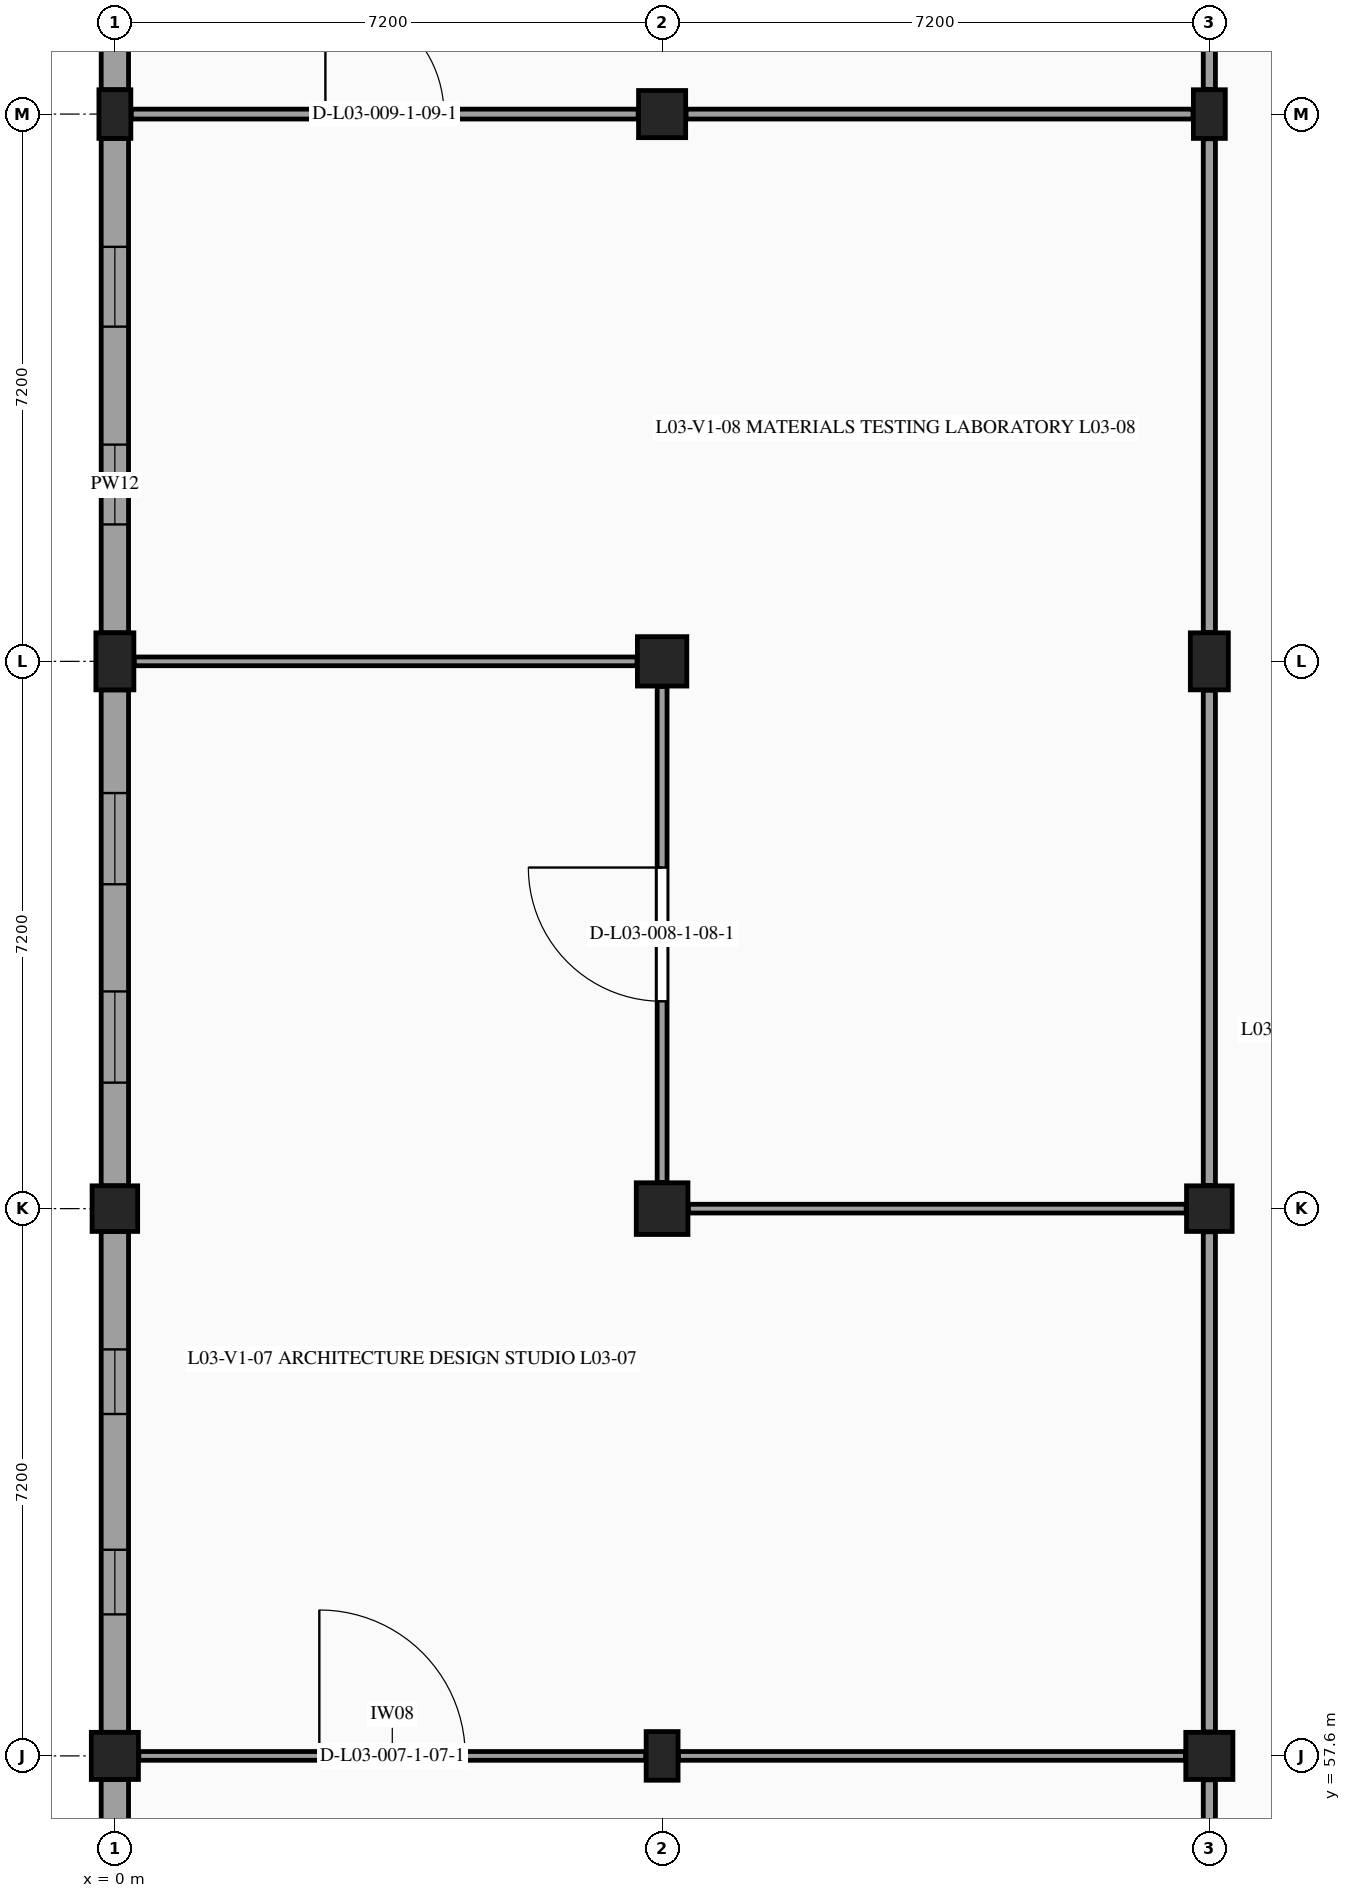
"""IFC4 building model, lengths in metres.
Left out: names, types, materials, properties, quantities, classifications, styles, units other than length and angle.
Written with IfcOpenShell. Run it as: python <this file> out.ifc"""

import sys

from ifc_helpers import new_model, si_unit, direction, frame, frame_2d, origin, origin_2d, place, context, subcontext, project, spatial, rectangle, extrude, element, fill, save


model = new_model("IFC4")
c1 = context("Model", 3, precision=1e-05, world=origin(), true_north=direction((0.0, 1.0)))
c2 = subcontext(c1, "Body", "Model", "MODEL_VIEW")
j1 = project(units=[si_unit("LENGTHUNIT", "METRE"), si_unit("PLANEANGLEUNIT", "RADIAN")], contexts=[c1])
p1 = place(None, origin())
s1 = spatial("IfcSite", under=j1, at=p1, CompositionType="ELEMENT")
p2 = place(p1, origin())
s2 = spatial("IfcBuilding", under=s1, at=p2, CompositionType="ELEMENT")
p3 = place(p2, frame((0.0, 0.0, 14.4)))
s3 = spatial("IfcBuildingStorey", under=s2, at=p3, CompositionType="ELEMENT", Elevation=14.4)
p4 = place(p3, frame((0.0, 57.6, 0.0), z_axis=(0.0, 0.0, 1.0), x_axis=(1.0, 0.0, 0.0)))
e1 = element("IfcColumn", 1, at=p4, inside=s3, PredefinedType="COLUMN", context=c2, shape_type="SweptSolid", body=[
    extrude(rectangle(XDim=0.62, YDim=0.62, at=origin_2d()), origin(), (0.0, 0.0, 1.0), 4.2),
])
p5 = place(p3, frame((0.0, 64.8, 0.0), z_axis=(0.0, 0.0, 1.0), x_axis=(1.0, 0.0, 0.0)))
e2 = element("IfcColumn", 2, at=p5, inside=s3, PredefinedType="COLUMN", context=c2, shape_type="SweptSolid", body=[
    extrude(rectangle(XDim=0.6, YDim=0.6, at=origin_2d()), origin(), (0.0, 0.0, 1.0), 4.2),
])
p6 = place(p3, frame((0.0, 72.0, 0.0), z_axis=(0.0, 0.0, 1.0), x_axis=(1.0, 0.0, 0.0)))
e3 = element("IfcColumn", 3, at=p6, inside=s3, PredefinedType="COLUMN", context=c2, shape_type="SweptSolid", body=[
    extrude(rectangle(XDim=0.5, YDim=0.75, at=origin_2d()), origin(), (0.0, 0.0, 1.0), 4.2),
])
for number, where, z_axis, x_axis in (
    (4, (0.0, 79.2, 0.0), (0.0, 0.0, 1.0), (1.0, 0.0, 0.0)),
    (5, (7.2, 57.6, 0.0), (0.0, 0.0, 1.0), (1.0, 0.0, 0.0)),
):
    element("IfcColumn", number, at=place(p3, frame(where, z_axis=z_axis, x_axis=x_axis)), inside=s3, PredefinedType="PILASTER", context=c2, shape_type="SweptSolid", body=[
        extrude(rectangle(XDim=0.42, YDim=0.64, at=origin_2d()), origin(), (0.0, 0.0, 1.0), 4.2),
    ])
p7 = place(p3, frame((7.2, 64.8, 0.0), z_axis=(0.0, 0.0, 1.0), x_axis=(1.0, 0.0, 0.0)))
e6 = element("IfcColumn", 6, at=p7, inside=s3, PredefinedType="COLUMN", context=c2, shape_type="SweptSolid", body=[
    extrude(rectangle(XDim=0.68, YDim=0.68, at=origin_2d()), origin(), (0.0, 0.0, 1.0), 4.2),
])
p8 = place(p3, frame((7.2, 72.0, 0.0), z_axis=(0.0, 0.0, 1.0), x_axis=(1.0, 0.0, 0.0)))
e7 = element("IfcColumn", 7, at=p8, inside=s3, PredefinedType="COLUMN", context=c2, shape_type="SweptSolid", body=[
    extrude(rectangle(XDim=0.65, YDim=0.65, at=origin_2d()), origin(), (0.0, 0.0, 1.0), 4.2),
])
for number, where, z_axis, x_axis in (
    (8, (7.2, 79.2, 0.0), (0.0, 0.0, 1.0), (1.0, 0.0, 0.0)),
    (9, (14.4, 57.6, 0.0), (0.0, 0.0, 1.0), (1.0, 0.0, 0.0)),
):
    element("IfcColumn", number, at=place(p3, frame(where, z_axis=z_axis, x_axis=x_axis)), inside=s3, PredefinedType="COLUMN", context=c2, shape_type="SweptSolid", body=[
        extrude(rectangle(XDim=0.62, YDim=0.62, at=origin_2d()), origin(), (0.0, 0.0, 1.0), 4.2),
    ])
p9 = place(p3, frame((14.4, 64.8, 0.0), z_axis=(0.0, 0.0, 1.0), x_axis=(1.0, 0.0, 0.0)))
e10 = element("IfcColumn", 10, at=p9, inside=s3, PredefinedType="COLUMN", context=c2, shape_type="SweptSolid", body=[
    extrude(rectangle(XDim=0.6, YDim=0.6, at=origin_2d()), origin(), (0.0, 0.0, 1.0), 4.2),
])
p10 = place(p3, frame((14.4, 72.0, 0.0), z_axis=(0.0, 0.0, 1.0), x_axis=(1.0, 0.0, 0.0)))
e11 = element("IfcColumn", 11, at=p10, inside=s3, PredefinedType="COLUMN", context=c2, shape_type="SweptSolid", body=[
    extrude(rectangle(XDim=0.5, YDim=0.75, at=origin_2d()), origin(), (0.0, 0.0, 1.0), 4.2),
])
p11 = place(p3, frame((14.4, 79.2, 0.0), z_axis=(0.0, 0.0, 1.0), x_axis=(1.0, 0.0, 0.0)))
e12 = element("IfcColumn", 12, at=p11, inside=s3, PredefinedType="PILASTER", context=c2, shape_type="SweptSolid", body=[
    extrude(rectangle(XDim=0.42, YDim=0.64, at=origin_2d()), origin(), (0.0, 0.0, 1.0), 4.2),
])
p12 = place(p3, frame((0.0, 50.725, 0.0), z_axis=(0.0, 0.0, 1.0), x_axis=(0.0, 1.0, 0.0)))
e13 = element("IfcWall", 13, at=p12, inside=s3, PredefinedType="STANDARD", context=c2, shape_type="SweptSolid", body=[
    extrude(rectangle(XDim=6.565, YDim=0.36, at=frame_2d((3.282, 0.0))), origin(), (0.0, 0.0, 1.0), 3.135),
])
p13 = place(p12, frame((1.469, 0.0, 1.15)))
e14 = element("IfcOpeningElement", 14, at=p13, cuts=e13, PredefinedType="OPENING", context=c2, shape_type="SweptSolid", body=[
    extrude(rectangle(XDim=1.0, YDim=1.2, at=frame_2d((0.5, 0.6))), frame((0.0, 0.19, 0.0), z_axis=(0.0, -1.0, 0.0), x_axis=(1.0, 0.0, 0.0)), (0.0, 0.0, 1.0), 0.38),
])
p14 = place(p12, frame((4.095, 0.0, 1.15)))
e15 = element("IfcOpeningElement", 15, at=p14, cuts=e13, PredefinedType="OPENING", context=c2, shape_type="SweptSolid", body=[
    extrude(rectangle(XDim=1.0, YDim=1.2, at=frame_2d((0.5, 0.6))), frame((0.0, 0.19, 0.0), z_axis=(0.0, -1.0, 0.0), x_axis=(1.0, 0.0, 0.0)), (0.0, 0.0, 1.0), 0.38),
])
p15 = place(p3, frame((0.0, 57.91, 0.0), z_axis=(0.0, 0.0, 1.0), x_axis=(0.0, 1.0, 0.0)))
e16 = element("IfcWall", 16, at=p15, inside=s3, PredefinedType="STANDARD", context=c2, shape_type="SweptSolid", body=[
    extrude(rectangle(XDim=6.59, YDim=0.36, at=frame_2d((3.295, 0.0))), origin(), (0.0, 0.0, 1.0), 3.135),
])
p16 = place(p15, frame((1.552, 0.0, 1.15)))
e17 = element("IfcOpeningElement", 17, at=p16, cuts=e16, PredefinedType="OPENING", context=c2, shape_type="SweptSolid", body=[
    extrude(rectangle(XDim=0.85, YDim=1.25, at=frame_2d((0.425, 0.625))), frame((0.0, 0.19, 0.0), z_axis=(0.0, -1.0, 0.0), x_axis=(1.0, 0.0, 0.0)), (0.0, 0.0, 1.0), 0.38),
])
p17 = place(p15, frame((4.188, 0.0, 1.15)))
e18 = element("IfcOpeningElement", 18, at=p17, cuts=e16, PredefinedType="OPENING", context=c2, shape_type="SweptSolid", body=[
    extrude(rectangle(XDim=0.85, YDim=1.25, at=frame_2d((0.425, 0.625))), frame((0.0, 0.19, 0.0), z_axis=(0.0, -1.0, 0.0), x_axis=(1.0, 0.0, 0.0)), (0.0, 0.0, 1.0), 0.38),
])
p18 = place(p3, frame((0.0, 65.1, 0.0), z_axis=(0.0, 0.0, 1.0), x_axis=(0.0, 1.0, 0.0)))
e19 = element("IfcWall", 19, at=p18, inside=s3, PredefinedType="STANDARD", context=c2, shape_type="SweptSolid", body=[
    extrude(rectangle(XDim=6.525, YDim=0.36, at=frame_2d((3.262, 0.0))), origin(), (0.0, 0.0, 1.0), 3.135),
])
p19 = place(p18, frame((1.357, 0.0, 1.15)))
e20 = element("IfcOpeningElement", 20, at=p19, cuts=e19, PredefinedType="OPENING", context=c2, shape_type="SweptSolid", body=[
    extrude(rectangle(XDim=1.2, YDim=1.35, at=frame_2d((0.6, 0.675))), frame((0.0, 0.19, 0.0), z_axis=(0.0, -1.0, 0.0), x_axis=(1.0, 0.0, 0.0)), (0.0, 0.0, 1.0), 0.38),
])
p20 = place(p18, frame((3.968, 0.0, 1.15)))
e21 = element("IfcOpeningElement", 21, at=p20, cuts=e19, PredefinedType="OPENING", context=c2, shape_type="SweptSolid", body=[
    extrude(rectangle(XDim=1.2, YDim=1.35, at=frame_2d((0.6, 0.675))), frame((0.0, 0.19, 0.0), z_axis=(0.0, -1.0, 0.0), x_axis=(1.0, 0.0, 0.0)), (0.0, 0.0, 1.0), 0.38),
])
p21 = place(p3, frame((0.0, 72.375, 0.0), z_axis=(0.0, 0.0, 1.0), x_axis=(0.0, 1.0, 0.0)))
e22 = element("IfcWall", 22, at=p21, inside=s3, PredefinedType="STANDARD", context=c2, shape_type="SweptSolid", body=[
    extrude(rectangle(XDim=6.505, YDim=0.36, at=frame_2d((3.252, 0.0))), origin(), (0.0, 0.0, 1.0), 3.135),
])
p22 = place(p21, frame((1.427, 0.0, 1.15)))
e23 = element("IfcOpeningElement", 23, at=p22, cuts=e22, PredefinedType="OPENING", context=c2, shape_type="SweptSolid", body=[
    extrude(rectangle(XDim=1.05, YDim=1.35, at=frame_2d((0.525, 0.675))), frame((0.0, 0.19, 0.0), z_axis=(0.0, -1.0, 0.0), x_axis=(1.0, 0.0, 0.0)), (0.0, 0.0, 1.0), 0.38),
])
p23 = place(p21, frame((4.029, 0.0, 1.15)))
e24 = element("IfcOpeningElement", 24, at=p23, cuts=e22, PredefinedType="OPENING", context=c2, shape_type="SweptSolid", body=[
    extrude(rectangle(XDim=1.05, YDim=1.35, at=frame_2d((0.525, 0.675))), frame((0.0, 0.19, 0.0), z_axis=(0.0, -1.0, 0.0), x_axis=(1.0, 0.0, 0.0)), (0.0, 0.0, 1.0), 0.38),
])
p24 = place(p3, frame((0.0, 79.52, 0.0), z_axis=(0.0, 0.0, 1.0), x_axis=(0.0, 1.0, 0.0)))
e25 = element("IfcWall", 25, at=p24, inside=s3, PredefinedType="STANDARD", context=c2, shape_type="SweptSolid", body=[
    extrude(rectangle(XDim=6.54, YDim=0.36, at=frame_2d((3.27, 0.0))), origin(), (0.0, 0.0, 1.0), 3.135),
])
p25 = place(p24, frame((1.512, 0.0, 1.15)))
e26 = element("IfcOpeningElement", 26, at=p25, cuts=e25, PredefinedType="OPENING", context=c2, shape_type="SweptSolid", body=[
    extrude(rectangle(XDim=0.9, YDim=1.3, at=frame_2d((0.45, 0.65))), frame((0.0, 0.19, 0.0), z_axis=(0.0, -1.0, 0.0), x_axis=(1.0, 0.0, 0.0)), (0.0, 0.0, 1.0), 0.38),
])
p26 = place(p24, frame((4.128, 0.0, 1.15)))
e27 = element("IfcOpeningElement", 27, at=p26, cuts=e25, PredefinedType="OPENING", context=c2, shape_type="SweptSolid", body=[
    extrude(rectangle(XDim=0.9, YDim=1.3, at=frame_2d((0.45, 0.65))), frame((0.0, 0.19, 0.0), z_axis=(0.0, -1.0, 0.0), x_axis=(1.0, 0.0, 0.0)), (0.0, 0.0, 1.0), 0.38),
])
p27 = place(p3, frame((0.315, 57.6, 0.0), z_axis=(0.0, 0.0, 1.0), x_axis=(1.0, 0.0, 0.0)))
e28 = element("IfcWall", 28, at=p27, inside=s3, PredefinedType="PARTITIONING", context=c2, shape_type="SweptSolid", body=[
    extrude(rectangle(XDim=6.67, YDim=0.115, at=frame_2d((3.335, 0.0))), origin(), (0.0, 0.0, 1.0), 3.215),
])
p28 = place(p27, frame((2.375, 0.0, 0.0)))
e29 = element("IfcOpeningElement", 29, at=p28, cuts=e28, PredefinedType="OPENING", context=c2, shape_type="SweptSolid", body=[
    extrude(rectangle(XDim=1.92, YDim=2.35, at=frame_2d((0.96, 1.175))), frame((0.0, 0.067, 0.0), z_axis=(0.0, -1.0, 0.0), x_axis=(1.0, 0.0, 0.0)), (0.0, 0.0, 1.0), 0.135),
])
p29 = place(p3, frame((7.2, 65.145, 0.0), z_axis=(0.0, 0.0, 1.0), x_axis=(0.0, 1.0, 0.0)))
e30 = element("IfcWall", 30, at=p29, inside=s3, PredefinedType="PARTITIONING", context=c2, shape_type="SweptSolid", body=[
    extrude(rectangle(XDim=6.525, YDim=0.13, at=frame_2d((3.262, 0.0))), origin(), (0.0, 0.0, 1.0), 3.245),
])
p30 = place(p29, frame((2.383, 0.0, 0.0)))
e31 = element("IfcOpeningElement", 31, at=p30, cuts=e30, PredefinedType="OPENING", context=c2, shape_type="SweptSolid", body=[
    extrude(rectangle(XDim=1.76, YDim=2.3, at=frame_2d((0.88, 1.15))), frame((0.0, 0.075, 0.0), z_axis=(0.0, -1.0, 0.0), x_axis=(1.0, 0.0, 0.0)), (0.0, 0.0, 1.0), 0.15),
])
p31 = place(p3, frame((0.255, 72.0, 0.0), z_axis=(0.0, 0.0, 1.0), x_axis=(1.0, 0.0, 0.0)))
e32 = element("IfcWall", 32, at=p31, inside=s3, PredefinedType="PARTITIONING", context=c2, shape_type="SweptSolid", body=[
    extrude(rectangle(XDim=6.615, YDim=0.115, at=frame_2d((3.308, 0.0))), origin(), (0.0, 0.0, 1.0), 3.215),
])
p32 = place(p3, frame((0.215, 79.2, 0.0), z_axis=(0.0, 0.0, 1.0), x_axis=(1.0, 0.0, 0.0)))
e33 = element("IfcWall", 33, at=p32, inside=s3, PredefinedType="PARTITIONING", context=c2, shape_type="SweptSolid", body=[
    extrude(rectangle(XDim=6.67, YDim=0.13, at=frame_2d((3.335, 0.0))), origin(), (0.0, 0.0, 1.0), 3.215),
])
p33 = place(p32, frame((2.555, 0.0, 0.0)))
e34 = element("IfcOpeningElement", 34, at=p33, cuts=e33, PredefinedType="OPENING", context=c2, shape_type="SweptSolid", body=[
    extrude(rectangle(XDim=1.56, YDim=2.25, at=frame_2d((0.78, 1.125))), frame((0.0, 0.075, 0.0), z_axis=(0.0, -1.0, 0.0), x_axis=(1.0, 0.0, 0.0)), (0.0, 0.0, 1.0), 0.15),
])
p34 = place(p3, frame((14.4, 50.73, 0.0), z_axis=(0.0, 0.0, 1.0), x_axis=(0.0, 1.0, 0.0)))
e35 = element("IfcWall", 35, at=p34, inside=s3, PredefinedType="PARTITIONING", context=c2, shape_type="SweptSolid", body=[
    extrude(rectangle(XDim=6.555, YDim=0.16, at=frame_2d((3.277, 0.0))), origin(), (0.0, 0.0, 1.0), 3.25),
])
p35 = place(p3, frame((7.415, 57.6, 0.0), z_axis=(0.0, 0.0, 1.0), x_axis=(1.0, 0.0, 0.0)))
e36 = element("IfcWall", 36, at=p35, inside=s3, PredefinedType="PARTITIONING", context=c2, shape_type="SweptSolid", body=[
    extrude(rectangle(XDim=6.67, YDim=0.115, at=frame_2d((3.335, 0.0))), origin(), (0.0, 0.0, 1.0), 3.22),
])
p36 = place(p3, frame((14.4, 57.915, 0.0), z_axis=(0.0, 0.0, 1.0), x_axis=(0.0, 1.0, 0.0)))
e37 = element("IfcWall", 37, at=p36, inside=s3, PredefinedType="PARTITIONING", context=c2, shape_type="SweptSolid", body=[
    extrude(rectangle(XDim=6.58, YDim=0.16, at=frame_2d((3.29, 0.0))), origin(), (0.0, 0.0, 1.0), 3.245),
])
p37 = place(p3, frame((7.545, 64.8, 0.0), z_axis=(0.0, 0.0, 1.0), x_axis=(1.0, 0.0, 0.0)))
e38 = element("IfcWall", 38, at=p37, inside=s3, PredefinedType="PARTITIONING", context=c2, shape_type="SweptSolid", body=[
    extrude(rectangle(XDim=6.55, YDim=0.115, at=frame_2d((3.275, 0.0))), origin(), (0.0, 0.0, 1.0), 3.22),
])
p38 = place(p3, frame((14.4, 65.105, 0.0), z_axis=(0.0, 0.0, 1.0), x_axis=(0.0, 1.0, 0.0)))
e39 = element("IfcWall", 39, at=p38, inside=s3, PredefinedType="PARTITIONING", context=c2, shape_type="SweptSolid", body=[
    extrude(rectangle(XDim=6.515, YDim=0.16, at=frame_2d((3.258, 0.0))), origin(), (0.0, 0.0, 1.0), 3.245),
])
p39 = place(p3, frame((14.4, 72.38, 0.0), z_axis=(0.0, 0.0, 1.0), x_axis=(0.0, 1.0, 0.0)))
e40 = element("IfcWall", 40, at=p39, inside=s3, PredefinedType="PARTITIONING", context=c2, shape_type="SweptSolid", body=[
    extrude(rectangle(XDim=6.495, YDim=0.16, at=frame_2d((3.248, 0.0))), origin(), (0.0, 0.0, 1.0), 3.31),
])
p40 = place(p3, frame((7.515, 79.2, 0.0), z_axis=(0.0, 0.0, 1.0), x_axis=(1.0, 0.0, 0.0)))
e41 = element("IfcWall", 41, at=p40, inside=s3, PredefinedType="PARTITIONING", context=c2, shape_type="SweptSolid", body=[
    extrude(rectangle(XDim=6.67, YDim=0.13, at=frame_2d((3.335, 0.0))), origin(), (0.0, 0.0, 1.0), 3.22),
])
p41 = place(p3, frame((14.4, 79.525, 0.0), z_axis=(0.0, 0.0, 1.0), x_axis=(0.0, 1.0, 0.0)))
e42 = element("IfcWall", 42, at=p41, inside=s3, PredefinedType="PARTITIONING", context=c2, shape_type="SweptSolid", body=[
    extrude(rectangle(XDim=6.53, YDim=0.16, at=frame_2d((3.265, 0.0))), origin(), (0.0, 0.0, 1.0), 3.305),
])
p42 = place(p16, origin())
e43 = element("IfcWindow", 43, at=p42, inside=s3, PartitioningType="SINGLE_PANEL", PredefinedType="WINDOW", context=c2, shape_type="SweptSolid", body=[
    extrude(rectangle(XDim=0.85, YDim=1.25, at=frame_2d((0.425, 0.625))), frame((0.0, -0.08, 0.0), z_axis=(0.0, -1.0, 0.0), x_axis=(1.0, 0.0, 0.0)), (0.0, 0.0, 1.0), 0.06),
])
fill(e17, e43)
p43 = place(p17, origin())
e44 = element("IfcWindow", 44, at=p43, inside=s3, PartitioningType="SINGLE_PANEL", PredefinedType="WINDOW", context=c2, shape_type="SweptSolid", body=[
    extrude(rectangle(XDim=0.85, YDim=1.25, at=frame_2d((0.425, 0.625))), frame((0.0, -0.08, 0.0), z_axis=(0.0, -1.0, 0.0), x_axis=(1.0, 0.0, 0.0)), (0.0, 0.0, 1.0), 0.06),
])
fill(e18, e44)
p44 = place(p19, origin())
e45 = element("IfcWindow", 45, at=p44, inside=s3, PartitioningType="SINGLE_PANEL", PredefinedType="WINDOW", context=c2, shape_type="SweptSolid", body=[
    extrude(rectangle(XDim=1.2, YDim=1.35, at=frame_2d((0.6, 0.675))), frame((0.0, -0.08, 0.0), z_axis=(0.0, -1.0, 0.0), x_axis=(1.0, 0.0, 0.0)), (0.0, 0.0, 1.0), 0.06),
])
fill(e20, e45)
p45 = place(p20, origin())
e46 = element("IfcWindow", 46, at=p45, inside=s3, PartitioningType="SINGLE_PANEL", PredefinedType="WINDOW", context=c2, shape_type="SweptSolid", body=[
    extrude(rectangle(XDim=1.2, YDim=1.35, at=frame_2d((0.6, 0.675))), frame((0.0, -0.08, 0.0), z_axis=(0.0, -1.0, 0.0), x_axis=(1.0, 0.0, 0.0)), (0.0, 0.0, 1.0), 0.06),
])
fill(e21, e46)
p46 = place(p22, origin())
e47 = element("IfcWindow", 47, at=p46, inside=s3, PartitioningType="SINGLE_PANEL", PredefinedType="WINDOW", context=c2, shape_type="SweptSolid", body=[
    extrude(rectangle(XDim=1.05, YDim=1.35, at=frame_2d((0.525, 0.675))), frame((0.0, -0.08, 0.0), z_axis=(0.0, -1.0, 0.0), x_axis=(1.0, 0.0, 0.0)), (0.0, 0.0, 1.0), 0.06),
])
fill(e23, e47)
p47 = place(p23, origin())
e48 = element("IfcWindow", 48, at=p47, inside=s3, PartitioningType="SINGLE_PANEL", PredefinedType="WINDOW", context=c2, shape_type="SweptSolid", body=[
    extrude(rectangle(XDim=1.05, YDim=1.35, at=frame_2d((0.525, 0.675))), frame((0.0, -0.08, 0.0), z_axis=(0.0, -1.0, 0.0), x_axis=(1.0, 0.0, 0.0)), (0.0, 0.0, 1.0), 0.06),
])
fill(e24, e48)
p48 = place(p28, origin())
e49 = element("IfcDoor", 49, at=p48, inside=s3, OperationType="SINGLE_SWING_LEFT", PredefinedType="DOOR", context=c2, shape_type="SweptSolid", body=[
    extrude(rectangle(XDim=1.92, YDim=2.35, at=frame_2d((0.96, 1.175))), frame((0.0, 0.025, 0.0), z_axis=(0.0, -1.0, 0.0), x_axis=(1.0, 0.0, 0.0)), (0.0, 0.0, 1.0), 0.05),
])
fill(e29, e49)
p49 = place(p30, origin())
e50 = element("IfcDoor", 50, at=p49, inside=s3, OperationType="SINGLE_SWING_RIGHT", PredefinedType="DOOR", context=c2, shape_type="SweptSolid", body=[
    extrude(rectangle(XDim=1.76, YDim=2.3, at=frame_2d((0.88, 1.15))), frame((0.0, 0.025, 0.0), z_axis=(0.0, -1.0, 0.0), x_axis=(1.0, 0.0, 0.0)), (0.0, 0.0, 1.0), 0.05),
])
fill(e31, e50)
p50 = place(p33, origin())
e51 = element("IfcDoor", 51, at=p50, inside=s3, OperationType="SINGLE_SWING_LEFT", PredefinedType="DOOR", context=c2, shape_type="SweptSolid", body=[
    extrude(rectangle(XDim=1.56, YDim=2.25, at=frame_2d((0.78, 1.125))), frame((0.0, 0.025, 0.0), z_axis=(0.0, -1.0, 0.0), x_axis=(1.0, 0.0, 0.0)), (0.0, 0.0, 1.0), 0.05),
])
fill(e34, e51)
save(model, sys.argv[1])
